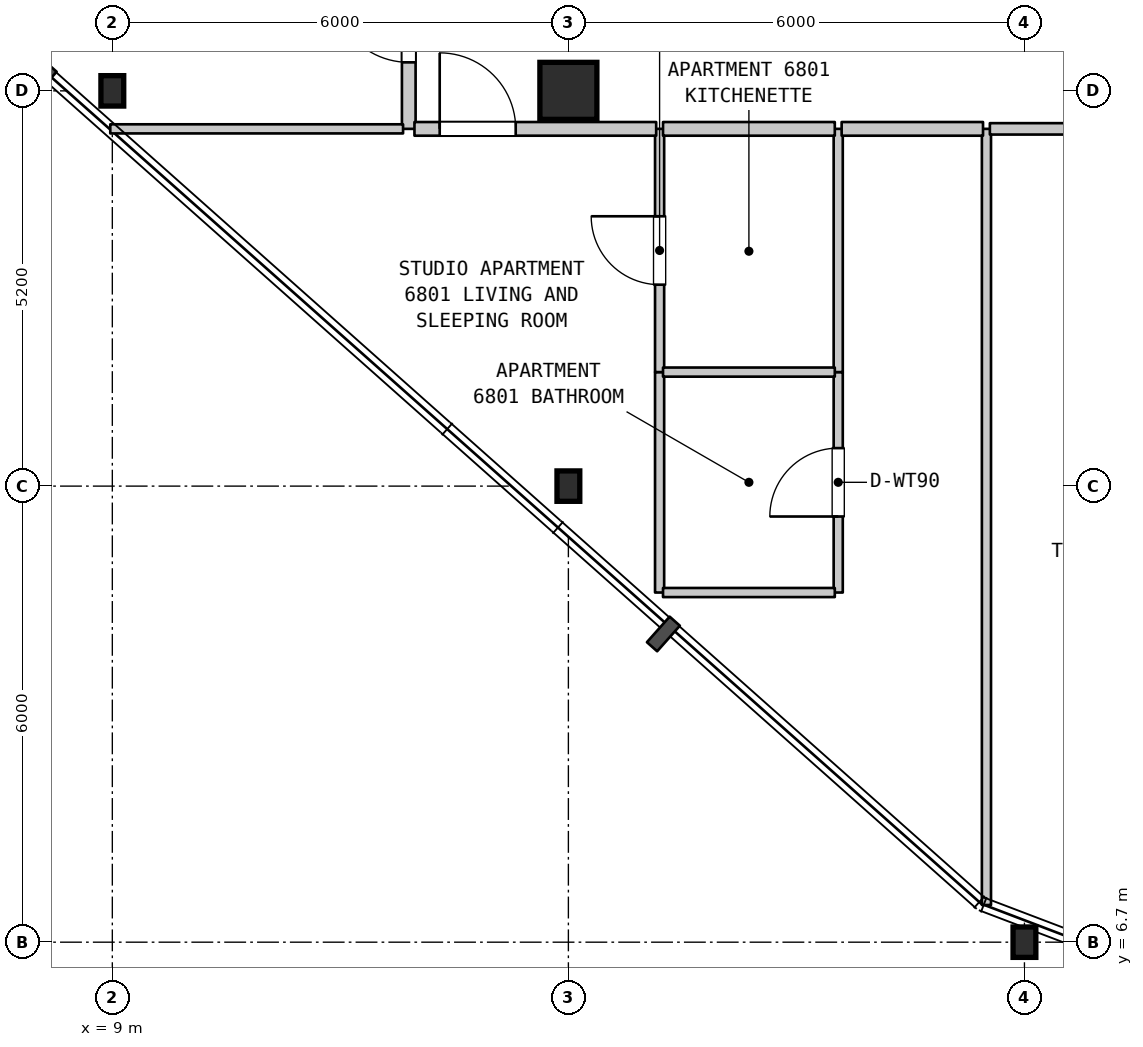
"""IFC4 building model, lengths in metres.
Left out: names, types, materials, properties, quantities, classifications, styles, units other than length and angle.
Written with IfcOpenShell. Run it as: python <this file> out.ifc"""

import sys

from ifc_helpers import new_model, si_unit, direction, frame, frame_2d, origin, origin_2d, place, context, subcontext, project, spatial, rectangle, i_section, extrude, element, fill, save


model = new_model("IFC4")
c1 = context("Model", 3, precision=1e-05, world=origin(), true_north=direction((0.0, 1.0)))
c2 = subcontext(c1, "Body", "Model", "MODEL_VIEW")
j1 = project(units=[si_unit("LENGTHUNIT", "METRE"), si_unit("PLANEANGLEUNIT", "RADIAN")], contexts=[c1])
p1 = place(None, origin())
s1 = spatial("IfcSite", under=j1, at=p1, CompositionType="ELEMENT")
p2 = place(p1, origin())
s2 = spatial("IfcBuilding", under=s1, at=p2, CompositionType="ELEMENT")
p3 = place(p2, frame((0.0, 0.0, 273.2)))
s3 = spatial("IfcBuildingStorey", under=s2, at=p3, CompositionType="ELEMENT", Elevation=273.2)
for number, where, z_axis, x_axis in (
    (1, (9.0, 17.9, 0.0), (0.0, 0.0, 1.0), (1.0, 0.0, 0.0)),
    (2, (15.0, 12.7, 0.0), (0.0, 0.0, 1.0), (1.0, 0.0, 0.0)),
):
    element("IfcColumn", number, at=place(p3, frame(where, z_axis=z_axis, x_axis=x_axis)), inside=s3, PredefinedType="COLUMN", context=c2, shape_type="SweptSolid", body=[
        extrude(i_section(OverallWidth=0.3, OverallDepth=0.4, WebThickness=0.013, FlangeThickness=0.024, FilletRadius=0.027, at=origin_2d()), origin(), (0.0, 0.0, 1.0), 3.7),
    ])
p4 = place(p3, frame((15.0, 17.9, 0.0), z_axis=(0.0, 0.0, 1.0), x_axis=(1.0, 0.0, 0.0)))
e3 = element("IfcColumn", 3, at=p4, inside=s3, PredefinedType="COLUMN", context=c2, shape_type="SweptSolid", body=[
    extrude(rectangle(XDim=0.75, YDim=0.75, at=origin_2d()), origin(), (0.0, 0.0, 1.0), 3.7),
])
p5 = place(p3, frame((21.0, 6.7, 0.0), z_axis=(0.0, 0.0, 1.0), x_axis=(1.0, 0.0, 0.0)))
e4 = element("IfcColumn", 4, at=p5, inside=s3, PredefinedType="COLUMN", context=c2, shape_type="SweptSolid", body=[
    extrude(i_section(OverallWidth=0.3, OverallDepth=0.4, WebThickness=0.013, FlangeThickness=0.024, FilletRadius=0.027, at=origin_2d()), origin(), (0.0, 0.0, 1.0), 3.7),
])
p6 = place(p3, frame((12.9, 17.4, 0.0), z_axis=(0.0, 0.0, 1.0), x_axis=(0.0, 1.0, 0.0)))
e5 = element("IfcWall", 5, at=p6, inside=s3, PredefinedType="STANDARD", context=c2, shape_type="SweptSolid", body=[
    extrude(rectangle(XDim=2.75, YDim=0.18, at=frame_2d((1.375, 0.0))), origin(), (0.0, 0.0, 1.0), 3.39),
])
p7 = place(p6, frame((0.875, 0.0, 0.0)))
e6 = element("IfcOpeningElement", 6, at=p7, cuts=e5, PredefinedType="OPENING", context=c2, shape_type="SweptSolid", body=[
    extrude(rectangle(XDim=1.0, YDim=2.15, at=frame_2d((0.5, 1.075))), frame((0.0, 0.1, 0.0), z_axis=(0.0, -1.0, 0.0), x_axis=(1.0, 0.0, 0.0)), (0.0, 0.0, 1.0), 0.2),
])
p8 = place(p3, frame((16.2, 11.3, 0.0), z_axis=(0.0, 0.0, 1.0), x_axis=(0.0, 1.0, 0.0)))
e7 = element("IfcWall", 7, at=p8, inside=s3, PredefinedType="PARTITIONING", context=c2, shape_type="SweptSolid", body=[
    extrude(rectangle(XDim=2.9, YDim=0.12, at=frame_2d((1.45, 0.0))), origin(), (0.0, 0.0, 1.0), 3.39),
])
p9 = place(p3, frame((16.2, 14.2, 0.0), z_axis=(0.0, 0.0, 1.0), x_axis=(0.0, 1.0, 0.0)))
e8 = element("IfcWall", 8, at=p9, inside=s3, PredefinedType="PARTITIONING", context=c2, shape_type="SweptSolid", body=[
    extrude(rectangle(XDim=3.2, YDim=0.12, at=frame_2d((1.6, 0.0))), origin(), (0.0, 0.0, 1.0), 3.39),
])
p10 = place(p9, frame((1.15, 0.0, 0.0)))
e9 = element("IfcOpeningElement", 9, at=p10, cuts=e8, PredefinedType="OPENING", context=c2, shape_type="SweptSolid", body=[
    extrude(rectangle(XDim=0.9, YDim=2.15, at=frame_2d((0.45, 1.075))), frame((0.0, 0.07, 0.0), z_axis=(0.0, -1.0, 0.0), x_axis=(1.0, 0.0, 0.0)), (0.0, 0.0, 1.0), 0.14),
])
p11 = place(p3, frame((18.55, 11.3, 0.0), z_axis=(0.0, 0.0, 1.0), x_axis=(0.0, 1.0, 0.0)))
e10 = element("IfcWall", 10, at=p11, inside=s3, PredefinedType="PARTITIONING", context=c2, shape_type="SweptSolid", body=[
    extrude(rectangle(XDim=2.9, YDim=0.12, at=frame_2d((1.45, 0.0))), origin(), (0.0, 0.0, 1.0), 3.39),
])
p12 = place(p11, frame((1.0, 0.0, 0.0)))
e11 = element("IfcOpeningElement", 11, at=p12, cuts=e10, PredefinedType="OPENING", context=c2, shape_type="SweptSolid", body=[
    extrude(rectangle(XDim=0.9, YDim=2.1, at=frame_2d((0.45, 1.05))), frame((0.0, 0.07, 0.0), z_axis=(0.0, -1.0, 0.0), x_axis=(1.0, 0.0, 0.0)), (0.0, 0.0, 1.0), 0.14),
])
p13 = place(p3, frame((18.55, 14.2, 0.0), z_axis=(0.0, 0.0, 1.0), x_axis=(0.0, 1.0, 0.0)))
e12 = element("IfcWall", 12, at=p13, inside=s3, PredefinedType="PARTITIONING", context=c2, shape_type="SweptSolid", body=[
    extrude(rectangle(XDim=3.2, YDim=0.12, at=frame_2d((1.6, 0.0))), origin(), (0.0, 0.0, 1.0), 3.39),
])
p14 = place(p3, frame((20.5, 7.189, 0.0), z_axis=(0.0, 0.0, 1.0), x_axis=(0.0, 1.0, 0.0)))
e13 = element("IfcWall", 13, at=p14, inside=s3, PredefinedType="PARTITIONING", context=c2, shape_type="SweptSolid", body=[
    extrude(rectangle(XDim=10.211, YDim=0.12, at=frame_2d((5.105, 0.0))), origin(), (0.0, 0.0, 1.0), 3.39),
])
for number, where, z_axis, x_axis in (
    (14, (16.245, 11.3, 0.0), (0.0, 0.0, 1.0), (1.0, 0.0, 0.0)),
    (15, (16.245, 14.2, 0.0), (0.0, 0.0, 1.0), (1.0, 0.0, 0.0)),
):
    element("IfcWall", number, at=place(p3, frame(where, z_axis=z_axis, x_axis=x_axis)), inside=s3, PredefinedType="PARTITIONING", context=c2, shape_type="SweptSolid", body=[
        extrude(rectangle(XDim=2.26, YDim=0.12, at=frame_2d((1.13, 0.0))), origin(), (0.0, 0.0, 1.0), 3.39),
    ])
p15 = place(p3, frame((8.973, 17.4, 0.0), z_axis=(0.0, 0.0, 1.0), x_axis=(1.0, 0.0, 0.0)))
e16 = element("IfcWall", 16, at=p15, inside=s3, PredefinedType="PARTITIONING", context=c2, shape_type="SweptSolid", body=[
    extrude(rectangle(XDim=3.852, YDim=0.12, at=frame_2d((1.926, 0.0))), origin(), (0.0, 0.0, 1.0), 3.39),
])
p16 = place(p3, frame((12.975, 17.4, 0.0), z_axis=(0.0, 0.0, 1.0), x_axis=(1.0, 0.0, 0.0)))
e17 = element("IfcWall", 17, at=p16, inside=s3, PredefinedType="STANDARD", context=c2, shape_type="SweptSolid", body=[
    extrude(rectangle(XDim=3.18, YDim=0.18, at=frame_2d((1.59, 0.0))), origin(), (0.0, 0.0, 1.0), 3.39),
])
p17 = place(p16, frame((0.332, 0.0, 0.0)))
e18 = element("IfcOpeningElement", 18, at=p17, cuts=e17, PredefinedType="OPENING", context=c2, shape_type="SweptSolid", body=[
    extrude(rectangle(XDim=1.0, YDim=2.15, at=frame_2d((0.5, 1.075))), frame((0.0, 0.1, 0.0), z_axis=(0.0, -1.0, 0.0), x_axis=(1.0, 0.0, 0.0)), (0.0, 0.0, 1.0), 0.2),
])
p18 = place(p3, frame((16.245, 17.4, 0.0), z_axis=(0.0, 0.0, 1.0), x_axis=(1.0, 0.0, 0.0)))
e19 = element("IfcWall", 19, at=p18, inside=s3, PredefinedType="STANDARD", context=c2, shape_type="SweptSolid", body=[
    extrude(rectangle(XDim=2.26, YDim=0.18, at=frame_2d((1.13, 0.0))), origin(), (0.0, 0.0, 1.0), 3.39),
])
p19 = place(p3, frame((18.595, 17.4, 0.0), z_axis=(0.0, 0.0, 1.0), x_axis=(1.0, 0.0, 0.0)))
e20 = element("IfcWall", 20, at=p19, inside=s3, PredefinedType="STANDARD", context=c2, shape_type="SweptSolid", body=[
    extrude(rectangle(XDim=1.86, YDim=0.18, at=frame_2d((0.93, 0.0))), origin(), (0.0, 0.0, 1.0), 3.39),
])
p20 = place(p3, frame((20.545, 17.4, 0.0), z_axis=(0.0, 0.0, 1.0), x_axis=(1.0, 0.0, 0.0)))
e21 = element("IfcWall", 21, at=p20, inside=s3, PredefinedType="STANDARD", context=c2, shape_type="SweptSolid", body=[
    extrude(rectangle(XDim=3.91, YDim=0.15, at=frame_2d((1.955, 0.0))), origin(), (0.0, 0.0, 1.0), 3.39),
])
p21 = place(p20, frame((1.455, 0.0, 0.0)))
e22 = element("IfcOpeningElement", 22, at=p21, cuts=e21, PredefinedType="OPENING", context=c2, shape_type="SweptSolid", body=[
    extrude(rectangle(XDim=1.0, YDim=2.15, at=frame_2d((0.5, 1.075))), frame((0.0, 0.085, 0.0), z_axis=(0.0, -1.0, 0.0), x_axis=(1.0, 0.0, 0.0)), (0.0, 0.0, 1.0), 0.17),
])
p22 = place(p7, origin())
e23 = element("IfcDoor", 23, at=p22, inside=s3, OperationType="SINGLE_SWING_RIGHT", PredefinedType="DOOR", context=c2, shape_type="SweptSolid", body=[
    extrude(rectangle(XDim=1.0, YDim=2.15, at=frame_2d((0.5, 1.075))), frame((0.0, 0.025, 0.0), z_axis=(0.0, -1.0, 0.0), x_axis=(1.0, 0.0, 0.0)), (0.0, 0.0, 1.0), 0.05),
])
fill(e6, e23)
p23 = place(p10, origin())
e24 = element("IfcDoor", 24, at=p23, inside=s3, OperationType="SINGLE_SWING_RIGHT", PredefinedType="DOOR", context=c2, shape_type="SweptSolid", body=[
    extrude(rectangle(XDim=0.9, YDim=2.15, at=frame_2d((0.45, 1.075))), frame((0.0, 0.025, 0.0), z_axis=(0.0, -1.0, 0.0), x_axis=(1.0, 0.0, 0.0)), (0.0, 0.0, 1.0), 0.05),
])
fill(e9, e24)
p24 = place(p12, origin())
e25 = element("IfcDoor", 25, at=p24, inside=s3, OperationType="SINGLE_SWING_LEFT", PredefinedType="DOOR", context=c2, shape_type="SweptSolid", body=[
    extrude(rectangle(XDim=0.9, YDim=2.1, at=frame_2d((0.45, 1.05))), frame((0.0, 0.025, 0.0), z_axis=(0.0, -1.0, 0.0), x_axis=(1.0, 0.0, 0.0)), (0.0, 0.0, 1.0), 0.05),
])
fill(e11, e25)
p25 = place(p17, origin())
e26 = element("IfcDoor", 26, at=p25, inside=s3, OperationType="SINGLE_SWING_LEFT", PredefinedType="DOOR", context=c2, shape_type="SweptSolid", body=[
    extrude(rectangle(XDim=1.0, YDim=2.15, at=frame_2d((0.5, 1.075))), frame((0.0, 0.025, 0.0), z_axis=(0.0, -1.0, 0.0), x_axis=(1.0, 0.0, 0.0)), (0.0, 0.0, 1.0), 0.05),
])
fill(e18, e26)
save(model, sys.argv[1])
